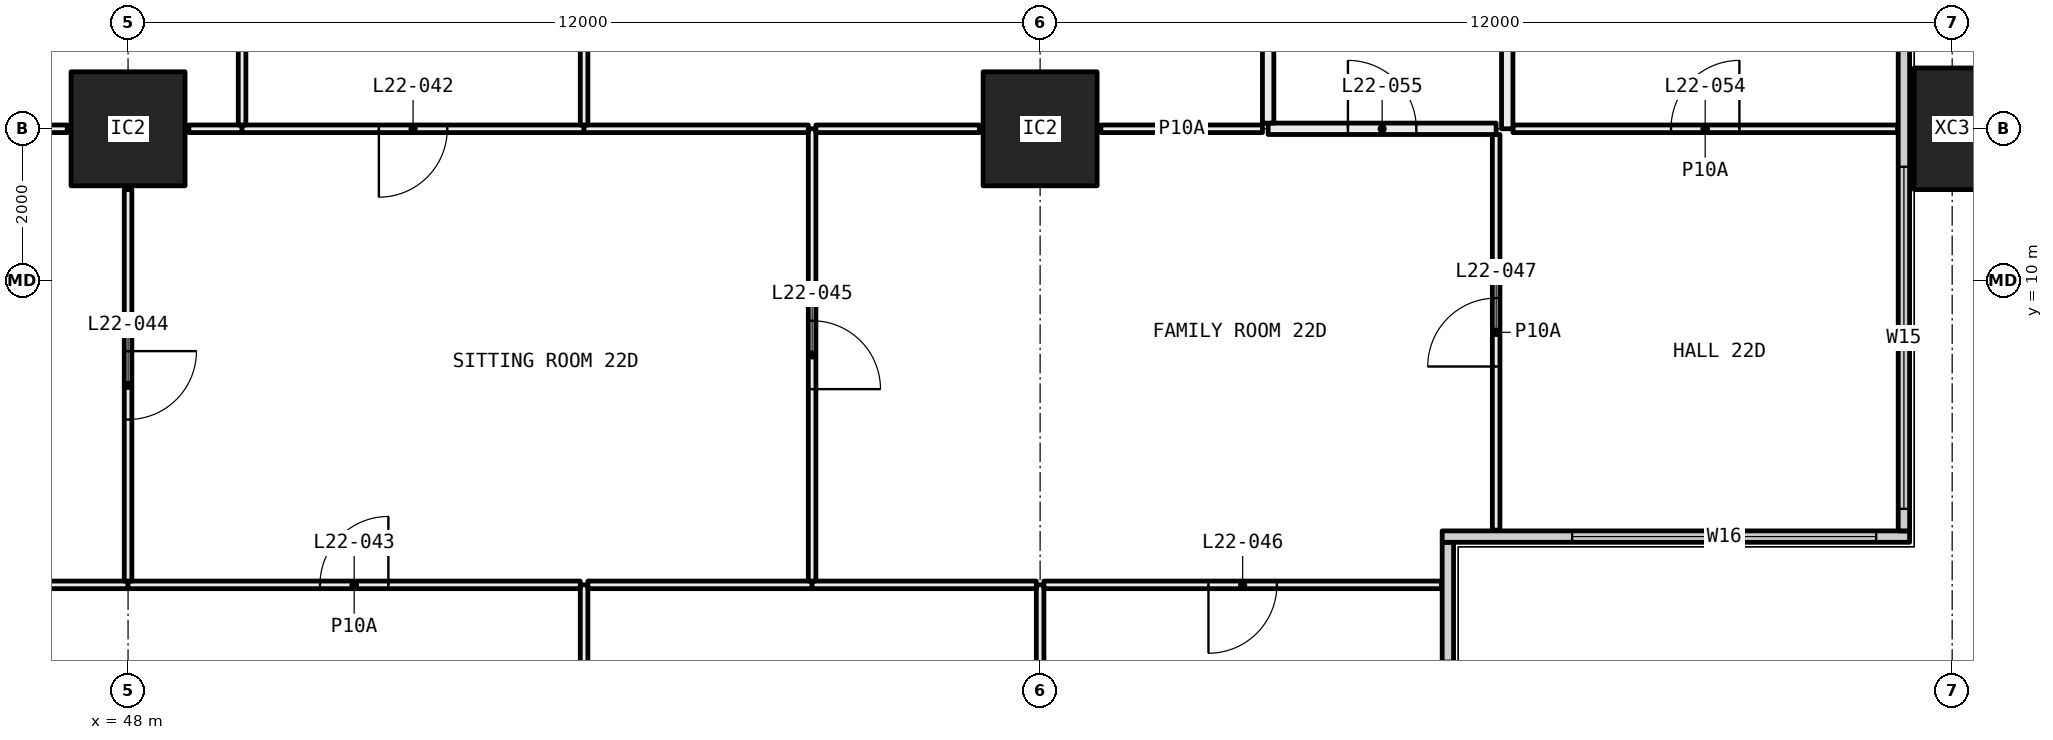
"""IFC4 building model, lengths in metres.
Left out: names, types, materials, properties, quantities, classifications, styles, units other than length and angle.
Written with IfcOpenShell. Run it as: python <this file> out.ifc"""

import sys

from ifc_helpers import new_model, si_unit, direction, frame, frame_2d, origin, origin_2d, place, context, subcontext, project, spatial, rectangle, hollow_rectangle, extrude, element, fill, save


model = new_model("IFC4")
c1 = context("Model", 3, precision=1e-05, world=origin(), true_north=direction((0.0, 1.0)))
c2 = subcontext(c1, "Body", "Model", "MODEL_VIEW")
j1 = project(units=[si_unit("LENGTHUNIT", "METRE"), si_unit("PLANEANGLEUNIT", "RADIAN")], contexts=[c1])
p1 = place(None, origin())
s1 = spatial("IfcSite", under=j1, at=p1, CompositionType="ELEMENT")
p2 = place(p1, origin())
s2 = spatial("IfcBuilding", under=s1, at=p2, CompositionType="ELEMENT")
p3 = place(p2, frame((0.0, 0.0, 88.65)))
s3 = spatial("IfcBuildingStorey", under=s2, at=p3, CompositionType="ELEMENT", Elevation=88.65)
for number, where, z_axis, x_axis in (
    (1, (48.0, 12.0, 0.0), (0.0, 0.0, 1.0), (1.0, 0.0, 0.0)),
    (2, (60.0, 12.0, 0.0), (0.0, 0.0, 1.0), (1.0, 0.0, 0.0)),
):
    element("IfcColumn", number, at=place(p3, frame(where, z_axis=z_axis, x_axis=x_axis)), inside=s3, PredefinedType="COLUMN", context=c2, shape_type="SweptSolid", body=[
        extrude(hollow_rectangle(XDim=1.5, YDim=1.5, WallThickness=0.065, at=origin_2d()), origin(), (0.0, 0.0, 1.0), 3.05),
    ])
p4 = place(p3, frame((72.0, 12.0, -0.4), z_axis=(0.0, 0.0, 1.0), x_axis=(0.0, 1.0, 0.0)))
e3 = element("IfcColumn", 3, at=p4, inside=s3, PredefinedType="COLUMN", context=c2, shape_type="SweptSolid", body=[
    extrude(hollow_rectangle(XDim=1.6, YDim=1.0, WallThickness=0.065, at=origin_2d()), origin(), (0.0, 0.0, 1.0), 3.45),
])
p5 = place(p3, frame((65.365, 0.71, 0.0), z_axis=(0.0, 0.0, 1.0), x_axis=(0.0, 1.0, 0.0)))
e4 = element("IfcWall", 4, at=p5, inside=s3, PredefinedType="ELEMENTEDWALL", context=c2, shape_type="SweptSolid", body=[
    extrude(rectangle(XDim=5.85, YDim=0.15, at=frame_2d((2.925, 0.0))), origin(), (0.0, 0.0, 1.0), 3.05),
])
p6 = place(p5, frame((0.29, 0.0, 0.45)))
e5 = element("IfcOpeningElement", 5, at=p6, cuts=e4, PredefinedType="OPENING", context=c2, shape_type="SweptSolid", body=[
    extrude(rectangle(XDim=4.0, YDim=2.55, at=frame_2d((2.0, 1.275))), frame((0.0, 0.085, 0.0), z_axis=(0.0, -1.0, 0.0), x_axis=(1.0, 0.0, 0.0)), (0.0, 0.0, 1.0), 0.17),
])
p7 = place(p3, frame((65.29, 6.635, 0.0), z_axis=(0.0, 0.0, 1.0), x_axis=(1.0, 0.0, 0.0)))
e6 = element("IfcWall", 6, at=p7, inside=s3, PredefinedType="ELEMENTEDWALL", context=c2, shape_type="SweptSolid", body=[
    extrude(rectangle(XDim=6.15, YDim=0.15, at=frame_2d((3.075, 0.0))), origin(), (0.0, 0.0, 1.0), 3.05),
])
p8 = place(p7, frame((1.71, 0.0, 0.45)))
e7 = element("IfcOpeningElement", 7, at=p8, cuts=e6, PredefinedType="OPENING", context=c2, shape_type="SweptSolid", body=[
    extrude(rectangle(XDim=4.0, YDim=2.55, at=frame_2d((2.0, 1.275))), frame((0.0, 0.085, 0.0), z_axis=(0.0, -1.0, 0.0), x_axis=(1.0, 0.0, 0.0)), (0.0, 0.0, 1.0), 0.17),
])
p9 = place(p3, frame((71.365, 6.71, 0.0), z_axis=(0.0, 0.0, 1.0), x_axis=(0.0, 1.0, 0.0)))
e8 = element("IfcWall", 8, at=p9, inside=s3, PredefinedType="ELEMENTEDWALL", context=c2, shape_type="SweptSolid", body=[
    extrude(rectangle(XDim=34.58, YDim=0.15, at=frame_2d((17.29, 0.0))), origin(), (0.0, 0.0, 1.0), 3.05),
])
p10 = place(p9, frame((0.29, 0.0, 0.45)))
e9 = element("IfcOpeningElement", 9, at=p10, cuts=e8, PredefinedType="OPENING", context=c2, shape_type="SweptSolid", body=[
    extrude(rectangle(XDim=4.5, YDim=2.55, at=frame_2d((2.25, 1.275))), frame((0.0, 0.085, 0.0), z_axis=(0.0, -1.0, 0.0), x_axis=(1.0, 0.0, 0.0)), (0.0, 0.0, 1.0), 0.17),
])
p11 = place(p9, frame((7.54, 0.0, 0.45)))
e10 = element("IfcOpeningElement", 10, at=p11, cuts=e8, PredefinedType="OPENING", context=c2, shape_type="SweptSolid", body=[
    extrude(rectangle(XDim=3.25, YDim=2.55, at=frame_2d((1.625, 1.275))), frame((0.0, 0.085, 0.0), z_axis=(0.0, -1.0, 0.0), x_axis=(1.0, 0.0, 0.0)), (0.0, 0.0, 1.0), 0.17),
])
p12 = place(p9, frame((11.79, 0.0, 0.45)))
e11 = element("IfcOpeningElement", 11, at=p12, cuts=e8, PredefinedType="OPENING", context=c2, shape_type="SweptSolid", body=[
    extrude(rectangle(XDim=3.25, YDim=2.55, at=frame_2d((1.625, 1.275))), frame((0.0, 0.085, 0.0), z_axis=(0.0, -1.0, 0.0), x_axis=(1.0, 0.0, 0.0)), (0.0, 0.0, 1.0), 0.17),
])
p13 = place(p9, frame((19.54, 0.0, 0.45)))
e12 = element("IfcOpeningElement", 12, at=p13, cuts=e8, PredefinedType="OPENING", context=c2, shape_type="SweptSolid", body=[
    extrude(rectangle(XDim=3.25, YDim=2.55, at=frame_2d((1.625, 1.275))), frame((0.0, 0.085, 0.0), z_axis=(0.0, -1.0, 0.0), x_axis=(1.0, 0.0, 0.0)), (0.0, 0.0, 1.0), 0.17),
])
p14 = place(p9, frame((23.79, 0.0, 0.45)))
e13 = element("IfcOpeningElement", 13, at=p14, cuts=e8, PredefinedType="OPENING", context=c2, shape_type="SweptSolid", body=[
    extrude(rectangle(XDim=2.0, YDim=2.55, at=frame_2d((1.0, 1.275))), frame((0.0, 0.085, 0.0), z_axis=(0.0, -1.0, 0.0), x_axis=(1.0, 0.0, 0.0)), (0.0, 0.0, 1.0), 0.17),
])
p15 = place(p9, frame((29.79, 0.0, 0.45)))
e14 = element("IfcOpeningElement", 14, at=p15, cuts=e8, PredefinedType="OPENING", context=c2, shape_type="SweptSolid", body=[
    extrude(rectangle(XDim=4.5, YDim=2.55, at=frame_2d((2.25, 1.275))), frame((0.0, 0.085, 0.0), z_axis=(0.0, -1.0, 0.0), x_axis=(1.0, 0.0, 0.0)), (0.0, 0.0, 1.0), 0.17),
])
p16 = place(p3, frame((54.0, 0.72, 0.0), z_axis=(0.0, 0.0, 1.0), x_axis=(0.0, 1.0, 0.0)))
e15 = element("IfcWall", 15, at=p16, inside=s3, PredefinedType="PARTITIONING", context=c2, shape_type="SweptSolid", body=[
    extrude(rectangle(XDim=5.28, YDim=0.1, at=frame_2d((2.64, 0.0))), origin(), (0.0, 0.0, 1.0), 3.05),
])
p17 = place(p16, frame((2.19, 0.0, 0.0)))
e16 = element("IfcOpeningElement", 16, at=p17, cuts=e15, PredefinedType="OPENING", context=c2, shape_type="SweptSolid", body=[
    extrude(rectangle(XDim=0.9, YDim=2.1, at=frame_2d((0.45, 1.05))), frame((0.0, 0.06, 0.0), z_axis=(0.0, -1.0, 0.0), x_axis=(1.0, 0.0, 0.0)), (0.0, 0.0, 1.0), 0.12),
])
p18 = place(p3, frame((48.0, 6.0, 0.0), z_axis=(0.0, 0.0, 1.0), x_axis=(-1.0, 0.0, 0.0)))
e17 = element("IfcWall", 17, at=p18, inside=s3, PredefinedType="PARTITIONING", context=c2, shape_type="SweptSolid", body=[
    extrude(rectangle(XDim=5.95, YDim=0.1, at=frame_2d((2.975, 0.0))), origin(), (0.0, 0.0, 1.0), 2.45),
])
p19 = place(p3, frame((53.95, 6.0, 0.0), z_axis=(0.0, 0.0, 1.0), x_axis=(-1.0, 0.0, 0.0)))
e18 = element("IfcWall", 18, at=p19, inside=s3, PredefinedType="PARTITIONING", context=c2, shape_type="SweptSolid", body=[
    extrude(rectangle(XDim=5.95, YDim=0.1, at=frame_2d((2.975, 0.0))), origin(), (0.0, 0.0, 1.0), 2.45),
])
p20 = place(p19, frame((2.525, 0.0, 0.0)))
e19 = element("IfcOpeningElement", 19, at=p20, cuts=e18, PredefinedType="OPENING", context=c2, shape_type="SweptSolid", body=[
    extrude(rectangle(XDim=0.9, YDim=2.1, at=frame_2d((0.45, 1.05))), frame((0.0, 0.06, 0.0), z_axis=(0.0, -1.0, 0.0), x_axis=(1.0, 0.0, 0.0)), (0.0, 0.0, 1.0), 0.12),
])
p21 = place(p3, frame((60.0, 0.72, 0.0), z_axis=(0.0, 0.0, 1.0), x_axis=(0.0, 1.0, 0.0)))
e20 = element("IfcWall", 20, at=p21, inside=s3, PredefinedType="PARTITIONING", context=c2, shape_type="SweptSolid", body=[
    extrude(rectangle(XDim=5.28, YDim=0.1, at=frame_2d((2.64, 0.0))), origin(), (0.0, 0.0, 1.0), 2.45),
])
p22 = place(p3, frame((57.0, 6.0, 0.0), z_axis=(0.0, 0.0, 1.0), x_axis=(-1.0, 0.0, 0.0)))
e21 = element("IfcWall", 21, at=p22, inside=s3, PredefinedType="PARTITIONING", context=c2, shape_type="SweptSolid", body=[
    extrude(rectangle(XDim=2.95, YDim=0.1, at=frame_2d((1.475, 0.0))), origin(), (0.0, 0.0, 1.0), 3.05),
])
p23 = place(p3, frame((59.95, 6.0, 0.0), z_axis=(0.0, 0.0, 1.0), x_axis=(-1.0, 0.0, 0.0)))
e22 = element("IfcWall", 22, at=p23, inside=s3, PredefinedType="PARTITIONING", context=c2, shape_type="SweptSolid", body=[
    extrude(rectangle(XDim=2.95, YDim=0.1, at=frame_2d((1.475, 0.0))), origin(), (0.0, 0.0, 1.0), 2.45),
])
p24 = place(p3, frame((65.28, 6.0, 0.0), z_axis=(0.0, 0.0, 1.0), x_axis=(-1.0, 0.0, 0.0)))
e23 = element("IfcWall", 23, at=p24, inside=s3, PredefinedType="PARTITIONING", context=c2, shape_type="SweptSolid", body=[
    extrude(rectangle(XDim=5.23, YDim=0.1, at=frame_2d((2.615, 0.0))), origin(), (0.0, 0.0, 1.0), 2.45),
])
p25 = place(p24, frame((2.165, 0.0, 0.0)))
e24 = element("IfcOpeningElement", 24, at=p25, cuts=e23, PredefinedType="OPENING", context=c2, shape_type="SweptSolid", body=[
    extrude(rectangle(XDim=0.9, YDim=2.1, at=frame_2d((0.45, 1.05))), frame((0.0, 0.06, 0.0), z_axis=(0.0, -1.0, 0.0), x_axis=(1.0, 0.0, 0.0)), (0.0, 0.0, 1.0), 0.12),
])
p26 = place(p3, frame((48.0, 6.05, 0.0), z_axis=(0.0, 0.0, 1.0), x_axis=(0.0, 1.0, 0.0)))
e25 = element("IfcWall", 25, at=p26, inside=s3, PredefinedType="PARTITIONING", context=c2, shape_type="SweptSolid", body=[
    extrude(rectangle(XDim=5.15, YDim=0.1, at=frame_2d((2.575, 0.0))), origin(), (0.0, 0.0, 1.0), 2.45),
])
p27 = place(p26, frame((2.125, 0.0, 0.0)))
e26 = element("IfcOpeningElement", 26, at=p27, cuts=e25, PredefinedType="OPENING", context=c2, shape_type="SweptSolid", body=[
    extrude(rectangle(XDim=0.9, YDim=2.1, at=frame_2d((0.45, 1.05))), frame((0.0, 0.06, 0.0), z_axis=(0.0, -1.0, 0.0), x_axis=(1.0, 0.0, 0.0)), (0.0, 0.0, 1.0), 0.12),
])
p28 = place(p3, frame((47.2, 12.0, 0.0), z_axis=(0.0, 0.0, 1.0), x_axis=(-1.0, 0.0, 0.0)))
e27 = element("IfcWall", 27, at=p28, inside=s3, PredefinedType="PARTITIONING", context=c2, shape_type="SweptSolid", body=[
    extrude(rectangle(XDim=5.2, YDim=0.1, at=frame_2d((2.6, 0.0))), origin(), (0.0, 0.0, 1.0), 2.45),
])
p29 = place(p3, frame((57.0, 6.05, 0.0), z_axis=(0.0, 0.0, 1.0), x_axis=(0.0, 1.0, 0.0)))
e28 = element("IfcWall", 28, at=p29, inside=s3, PredefinedType="PARTITIONING", context=c2, shape_type="SweptSolid", body=[
    extrude(rectangle(XDim=5.95, YDim=0.1, at=frame_2d((2.975, 0.0))), origin(), (0.0, 0.0, 1.0), 2.45),
])
p30 = place(p29, frame((2.525, 0.0, 0.0)))
e29 = element("IfcOpeningElement", 29, at=p30, cuts=e28, PredefinedType="OPENING", context=c2, shape_type="SweptSolid", body=[
    extrude(rectangle(XDim=0.9, YDim=2.1, at=frame_2d((0.45, 1.05))), frame((0.0, 0.06, 0.0), z_axis=(0.0, -1.0, 0.0), x_axis=(1.0, 0.0, 0.0)), (0.0, 0.0, 1.0), 0.12),
])
p31 = place(p3, frame((49.5, 12.0, 0.0), z_axis=(0.0, 0.0, 1.0), x_axis=(-1.0, 0.0, 0.0)))
e30 = element("IfcWall", 30, at=p31, inside=s3, PredefinedType="PARTITIONING", context=c2, shape_type="SweptSolid", body=[
    extrude(rectangle(XDim=0.7, YDim=0.1, at=frame_2d((0.35, 0.0))), origin(), (0.0, 0.0, 1.0), 2.45),
])
p32 = place(p3, frame((54.0, 12.0, 0.0), z_axis=(0.0, 0.0, 1.0), x_axis=(-1.0, 0.0, 0.0)))
e31 = element("IfcWall", 31, at=p32, inside=s3, PredefinedType="PARTITIONING", context=c2, shape_type="SweptSolid", body=[
    extrude(rectangle(XDim=4.5, YDim=0.1, at=frame_2d((2.25, 0.0))), origin(), (0.0, 0.0, 1.0), 2.45),
])
p33 = place(p32, frame((1.8, 0.0, 0.0)))
e32 = element("IfcOpeningElement", 32, at=p33, cuts=e31, PredefinedType="OPENING", context=c2, shape_type="SweptSolid", body=[
    extrude(rectangle(XDim=0.9, YDim=2.1, at=frame_2d((0.45, 1.05))), frame((0.0, 0.06, 0.0), z_axis=(0.0, -1.0, 0.0), x_axis=(1.0, 0.0, 0.0)), (0.0, 0.0, 1.0), 0.12),
])
p34 = place(p3, frame((56.95, 12.0, 0.0), z_axis=(0.0, 0.0, 1.0), x_axis=(-1.0, 0.0, 0.0)))
e33 = element("IfcWall", 33, at=p34, inside=s3, PredefinedType="PARTITIONING", context=c2, shape_type="SweptSolid", body=[
    extrude(rectangle(XDim=2.95, YDim=0.1, at=frame_2d((1.475, 0.0))), origin(), (0.0, 0.0, 1.0), 2.45),
])
p35 = place(p3, frame((66.0, 6.72, 0.0), z_axis=(0.0, 0.0, 1.0), x_axis=(0.0, 1.0, 0.0)))
e34 = element("IfcWall", 34, at=p35, inside=s3, PredefinedType="PARTITIONING", context=c2, shape_type="SweptSolid", body=[
    extrude(rectangle(XDim=5.205, YDim=0.1, at=frame_2d((2.603, 0.0))), origin(), (0.0, 0.0, 1.0), 2.45),
])
p36 = place(p35, frame((2.153, 0.0, 0.0)))
e35 = element("IfcOpeningElement", 35, at=p36, cuts=e34, PredefinedType="OPENING", context=c2, shape_type="SweptSolid", body=[
    extrude(rectangle(XDim=0.9, YDim=2.1, at=frame_2d((0.45, 1.05))), frame((0.0, 0.06, 0.0), z_axis=(0.0, -1.0, 0.0), x_axis=(1.0, 0.0, 0.0)), (0.0, 0.0, 1.0), 0.12),
])
p37 = place(p3, frame((59.2, 12.0, 0.0), z_axis=(0.0, 0.0, 1.0), x_axis=(-1.0, 0.0, 0.0)))
e36 = element("IfcWall", 36, at=p37, inside=s3, PredefinedType="PARTITIONING", context=c2, shape_type="SweptSolid", body=[
    extrude(rectangle(XDim=2.15, YDim=0.1, at=frame_2d((1.075, 0.0))), origin(), (0.0, 0.0, 1.0), 2.45),
])
p38 = place(p3, frame((62.925, 12.0, 0.0), z_axis=(0.0, 0.0, 1.0), x_axis=(-1.0, 0.0, 0.0)))
e37 = element("IfcWall", 37, at=p38, inside=s3, PredefinedType="PARTITIONING", context=c2, shape_type="SweptSolid", body=[
    extrude(rectangle(XDim=2.125, YDim=0.1, at=frame_2d((1.062, 0.0))), origin(), (0.0, 0.0, 1.0), 2.45),
])
p39 = place(p3, frame((66.0, 12.0, 0.0), z_axis=(0.0, 0.0, 1.0), x_axis=(-1.0, 0.0, 0.0)))
e38 = element("IfcWall", 38, at=p39, inside=s3, PredefinedType="PARTITIONING", context=c2, shape_type="SweptSolid", body=[
    extrude(rectangle(XDim=3.0, YDim=0.15, at=frame_2d((1.5, 0.0))), origin(), (0.0, 0.0, 1.0), 2.45),
])
p40 = place(p39, frame((1.05, 0.0, 0.0)))
e39 = element("IfcOpeningElement", 39, at=p40, cuts=e38, PredefinedType="OPENING", context=c2, shape_type="SweptSolid", body=[
    extrude(rectangle(XDim=0.9, YDim=2.1, at=frame_2d((0.45, 1.05))), frame((0.0, 0.085, 0.0), z_axis=(0.0, -1.0, 0.0), x_axis=(1.0, 0.0, 0.0)), (0.0, 0.0, 1.0), 0.17),
])
p41 = place(p3, frame((71.28, 12.0, 0.0), z_axis=(0.0, 0.0, 1.0), x_axis=(-1.0, 0.0, 0.0)))
e40 = element("IfcWall", 40, at=p41, inside=s3, PredefinedType="PARTITIONING", context=c2, shape_type="SweptSolid", body=[
    extrude(rectangle(XDim=5.059, YDim=0.1, at=frame_2d((2.53, 0.0))), origin(), (0.0, 0.0, 1.0), 2.45),
])
p42 = place(p41, frame((2.08, 0.0, 0.0)))
e41 = element("IfcOpeningElement", 41, at=p42, cuts=e40, PredefinedType="OPENING", context=c2, shape_type="SweptSolid", body=[
    extrude(rectangle(XDim=0.9, YDim=2.1, at=frame_2d((0.45, 1.05))), frame((0.0, 0.06, 0.0), z_axis=(0.0, -1.0, 0.0), x_axis=(1.0, 0.0, 0.0)), (0.0, 0.0, 1.0), 0.12),
])
p43 = place(p3, frame((49.5, 12.05, 0.0), z_axis=(0.0, 0.0, 1.0), x_axis=(0.0, 1.0, 0.0)))
e42 = element("IfcWall", 42, at=p43, inside=s3, PredefinedType="PARTITIONING", context=c2, shape_type="SweptSolid", body=[
    extrude(rectangle(XDim=5.85, YDim=0.1, at=frame_2d((2.925, 0.0))), origin(), (0.0, 0.0, 1.0), 2.45),
])
p44 = place(p43, frame((2.475, 0.0, 0.0)))
e43 = element("IfcOpeningElement", 43, at=p44, cuts=e42, PredefinedType="OPENING", context=c2, shape_type="SweptSolid", body=[
    extrude(rectangle(XDim=0.9, YDim=2.1, at=frame_2d((0.45, 1.05))), frame((0.0, 0.06, 0.0), z_axis=(0.0, -1.0, 0.0), x_axis=(1.0, 0.0, 0.0)), (0.0, 0.0, 1.0), 0.12),
])
p45 = place(p3, frame((54.0, 12.05, 0.0), z_axis=(0.0, 0.0, 1.0), x_axis=(0.0, 1.0, 0.0)))
e44 = element("IfcWall", 44, at=p45, inside=s3, PredefinedType="PARTITIONING", context=c2, shape_type="SweptSolid", body=[
    extrude(rectangle(XDim=5.85, YDim=0.1, at=frame_2d((2.925, 0.0))), origin(), (0.0, 0.0, 1.0), 2.45),
])
p46 = place(p45, frame((2.475, 0.0, 0.0)))
e45 = element("IfcOpeningElement", 45, at=p46, cuts=e44, PredefinedType="OPENING", context=c2, shape_type="SweptSolid", body=[
    extrude(rectangle(XDim=0.9, YDim=2.1, at=frame_2d((0.45, 1.05))), frame((0.0, 0.06, 0.0), z_axis=(0.0, -1.0, 0.0), x_axis=(1.0, 0.0, 0.0)), (0.0, 0.0, 1.0), 0.12),
])
p47 = place(p3, frame((63.0, 12.075, 0.0), z_axis=(0.0, 0.0, 1.0), x_axis=(0.0, 1.0, 0.0)))
e46 = element("IfcWall", 46, at=p47, inside=s3, PredefinedType="PARTITIONING", context=c2, shape_type="SweptSolid", body=[
    extrude(rectangle(XDim=3.739, YDim=0.15, at=frame_2d((1.87, 0.0))), origin(), (0.0, 0.0, 1.0), 2.45),
])
p48 = place(p3, frame((66.146, 15.814, 0.0), z_axis=(0.0, 0.0, 1.0), x_axis=(0.0, -1.0, 0.0)))
e47 = element("IfcWall", 47, at=p48, inside=s3, PredefinedType="PARTITIONING", context=c2, shape_type="SweptSolid", body=[
    extrude(rectangle(XDim=3.814, YDim=0.15, at=frame_2d((1.907, 0.0))), origin(), (0.0, 0.0, 1.0), 2.45),
])
p49 = place(p8, origin())
e48 = element("IfcWindow", 48, at=p49, inside=s3, PartitioningType="SINGLE_PANEL", PredefinedType="WINDOW", context=c2, shape_type="SweptSolid", body=[
    extrude(rectangle(XDim=4.0, YDim=2.55, at=frame_2d((2.0, 1.275))), frame((0.0, 0.03, 0.0), z_axis=(0.0, -1.0, 0.0), x_axis=(1.0, 0.0, 0.0)), (0.0, 0.0, 1.0), 0.06),
])
fill(e7, e48)
p50 = place(p10, origin())
e49 = element("IfcWindow", 49, at=p50, inside=s3, PartitioningType="SINGLE_PANEL", PredefinedType="WINDOW", context=c2, shape_type="SweptSolid", body=[
    extrude(rectangle(XDim=4.5, YDim=2.55, at=frame_2d((2.25, 1.275))), frame((0.0, 0.03, 0.0), z_axis=(0.0, -1.0, 0.0), x_axis=(1.0, 0.0, 0.0)), (0.0, 0.0, 1.0), 0.06),
])
fill(e9, e49)
p51 = place(p33, origin())
e50 = element("IfcDoor", 50, at=p51, inside=s3, OperationType="SINGLE_SWING_LEFT", PredefinedType="DOOR", context=c2, shape_type="SweptSolid", body=[
    extrude(rectangle(XDim=0.9, YDim=2.1, at=frame_2d((0.45, 1.05))), frame((0.0, 0.025, 0.0), z_axis=(0.0, -1.0, 0.0), x_axis=(1.0, 0.0, 0.0)), (0.0, 0.0, 1.0), 0.05),
])
fill(e32, e50)
p52 = place(p20, frame((0.9, 0.0, 0.0), x_axis=(-1.0, 0.0, 0.0)))
e51 = element("IfcDoor", 51, at=p52, inside=s3, OperationType="SINGLE_SWING_LEFT", PredefinedType="DOOR", context=c2, shape_type="SweptSolid", body=[
    extrude(rectangle(XDim=0.9, YDim=2.1, at=frame_2d((0.45, 1.05))), frame((0.0, 0.025, 0.0), z_axis=(0.0, -1.0, 0.0), x_axis=(1.0, 0.0, 0.0)), (0.0, 0.0, 1.0), 0.05),
])
fill(e19, e51)
p53 = place(p27, frame((0.9, 0.0, 0.0), x_axis=(-1.0, 0.0, 0.0)))
e52 = element("IfcDoor", 52, at=p53, inside=s3, OperationType="SINGLE_SWING_RIGHT", PredefinedType="DOOR", context=c2, shape_type="SweptSolid", body=[
    extrude(rectangle(XDim=0.9, YDim=2.1, at=frame_2d((0.45, 1.05))), frame((0.0, 0.025, 0.0), z_axis=(0.0, -1.0, 0.0), x_axis=(1.0, 0.0, 0.0)), (0.0, 0.0, 1.0), 0.05),
])
fill(e26, e52)
p54 = place(p30, frame((0.9, 0.0, 0.0), x_axis=(-1.0, 0.0, 0.0)))
e53 = element("IfcDoor", 53, at=p54, inside=s3, OperationType="SINGLE_SWING_LEFT", PredefinedType="DOOR", context=c2, shape_type="SweptSolid", body=[
    extrude(rectangle(XDim=0.9, YDim=2.1, at=frame_2d((0.45, 1.05))), frame((0.0, 0.025, 0.0), z_axis=(0.0, -1.0, 0.0), x_axis=(1.0, 0.0, 0.0)), (0.0, 0.0, 1.0), 0.05),
])
fill(e29, e53)
p55 = place(p25, origin())
e54 = element("IfcDoor", 54, at=p55, inside=s3, OperationType="SINGLE_SWING_LEFT", PredefinedType="DOOR", context=c2, shape_type="SweptSolid", body=[
    extrude(rectangle(XDim=0.9, YDim=2.1, at=frame_2d((0.45, 1.05))), frame((0.0, 0.025, 0.0), z_axis=(0.0, -1.0, 0.0), x_axis=(1.0, 0.0, 0.0)), (0.0, 0.0, 1.0), 0.05),
])
fill(e24, e54)
p56 = place(p36, origin())
e55 = element("IfcDoor", 55, at=p56, inside=s3, OperationType="SINGLE_SWING_RIGHT", PredefinedType="DOOR", context=c2, shape_type="SweptSolid", body=[
    extrude(rectangle(XDim=0.9, YDim=2.1, at=frame_2d((0.45, 1.05))), frame((0.0, 0.025, 0.0), z_axis=(0.0, -1.0, 0.0), x_axis=(1.0, 0.0, 0.0)), (0.0, 0.0, 1.0), 0.05),
])
fill(e35, e55)
p57 = place(p42, frame((0.9, 0.0, 0.0), x_axis=(-1.0, 0.0, 0.0)))
e56 = element("IfcDoor", 56, at=p57, inside=s3, OperationType="SINGLE_SWING_LEFT", PredefinedType="DOOR", context=c2, shape_type="SweptSolid", body=[
    extrude(rectangle(XDim=0.9, YDim=2.1, at=frame_2d((0.45, 1.05))), frame((0.0, 0.025, 0.0), z_axis=(0.0, -1.0, 0.0), x_axis=(1.0, 0.0, 0.0)), (0.0, 0.0, 1.0), 0.05),
])
fill(e41, e56)
p58 = place(p40, frame((0.9, 0.0, 0.0), x_axis=(-1.0, 0.0, 0.0)))
e57 = element("IfcDoor", 57, at=p58, inside=s3, OperationType="SINGLE_SWING_RIGHT", PredefinedType="DOOR", context=c2, shape_type="SweptSolid", body=[
    extrude(rectangle(XDim=0.9, YDim=2.1, at=frame_2d((0.45, 1.05))), frame((0.0, 0.025, 0.0), z_axis=(0.0, -1.0, 0.0), x_axis=(1.0, 0.0, 0.0)), (0.0, 0.0, 1.0), 0.05),
])
fill(e39, e57)
save(model, sys.argv[1])
